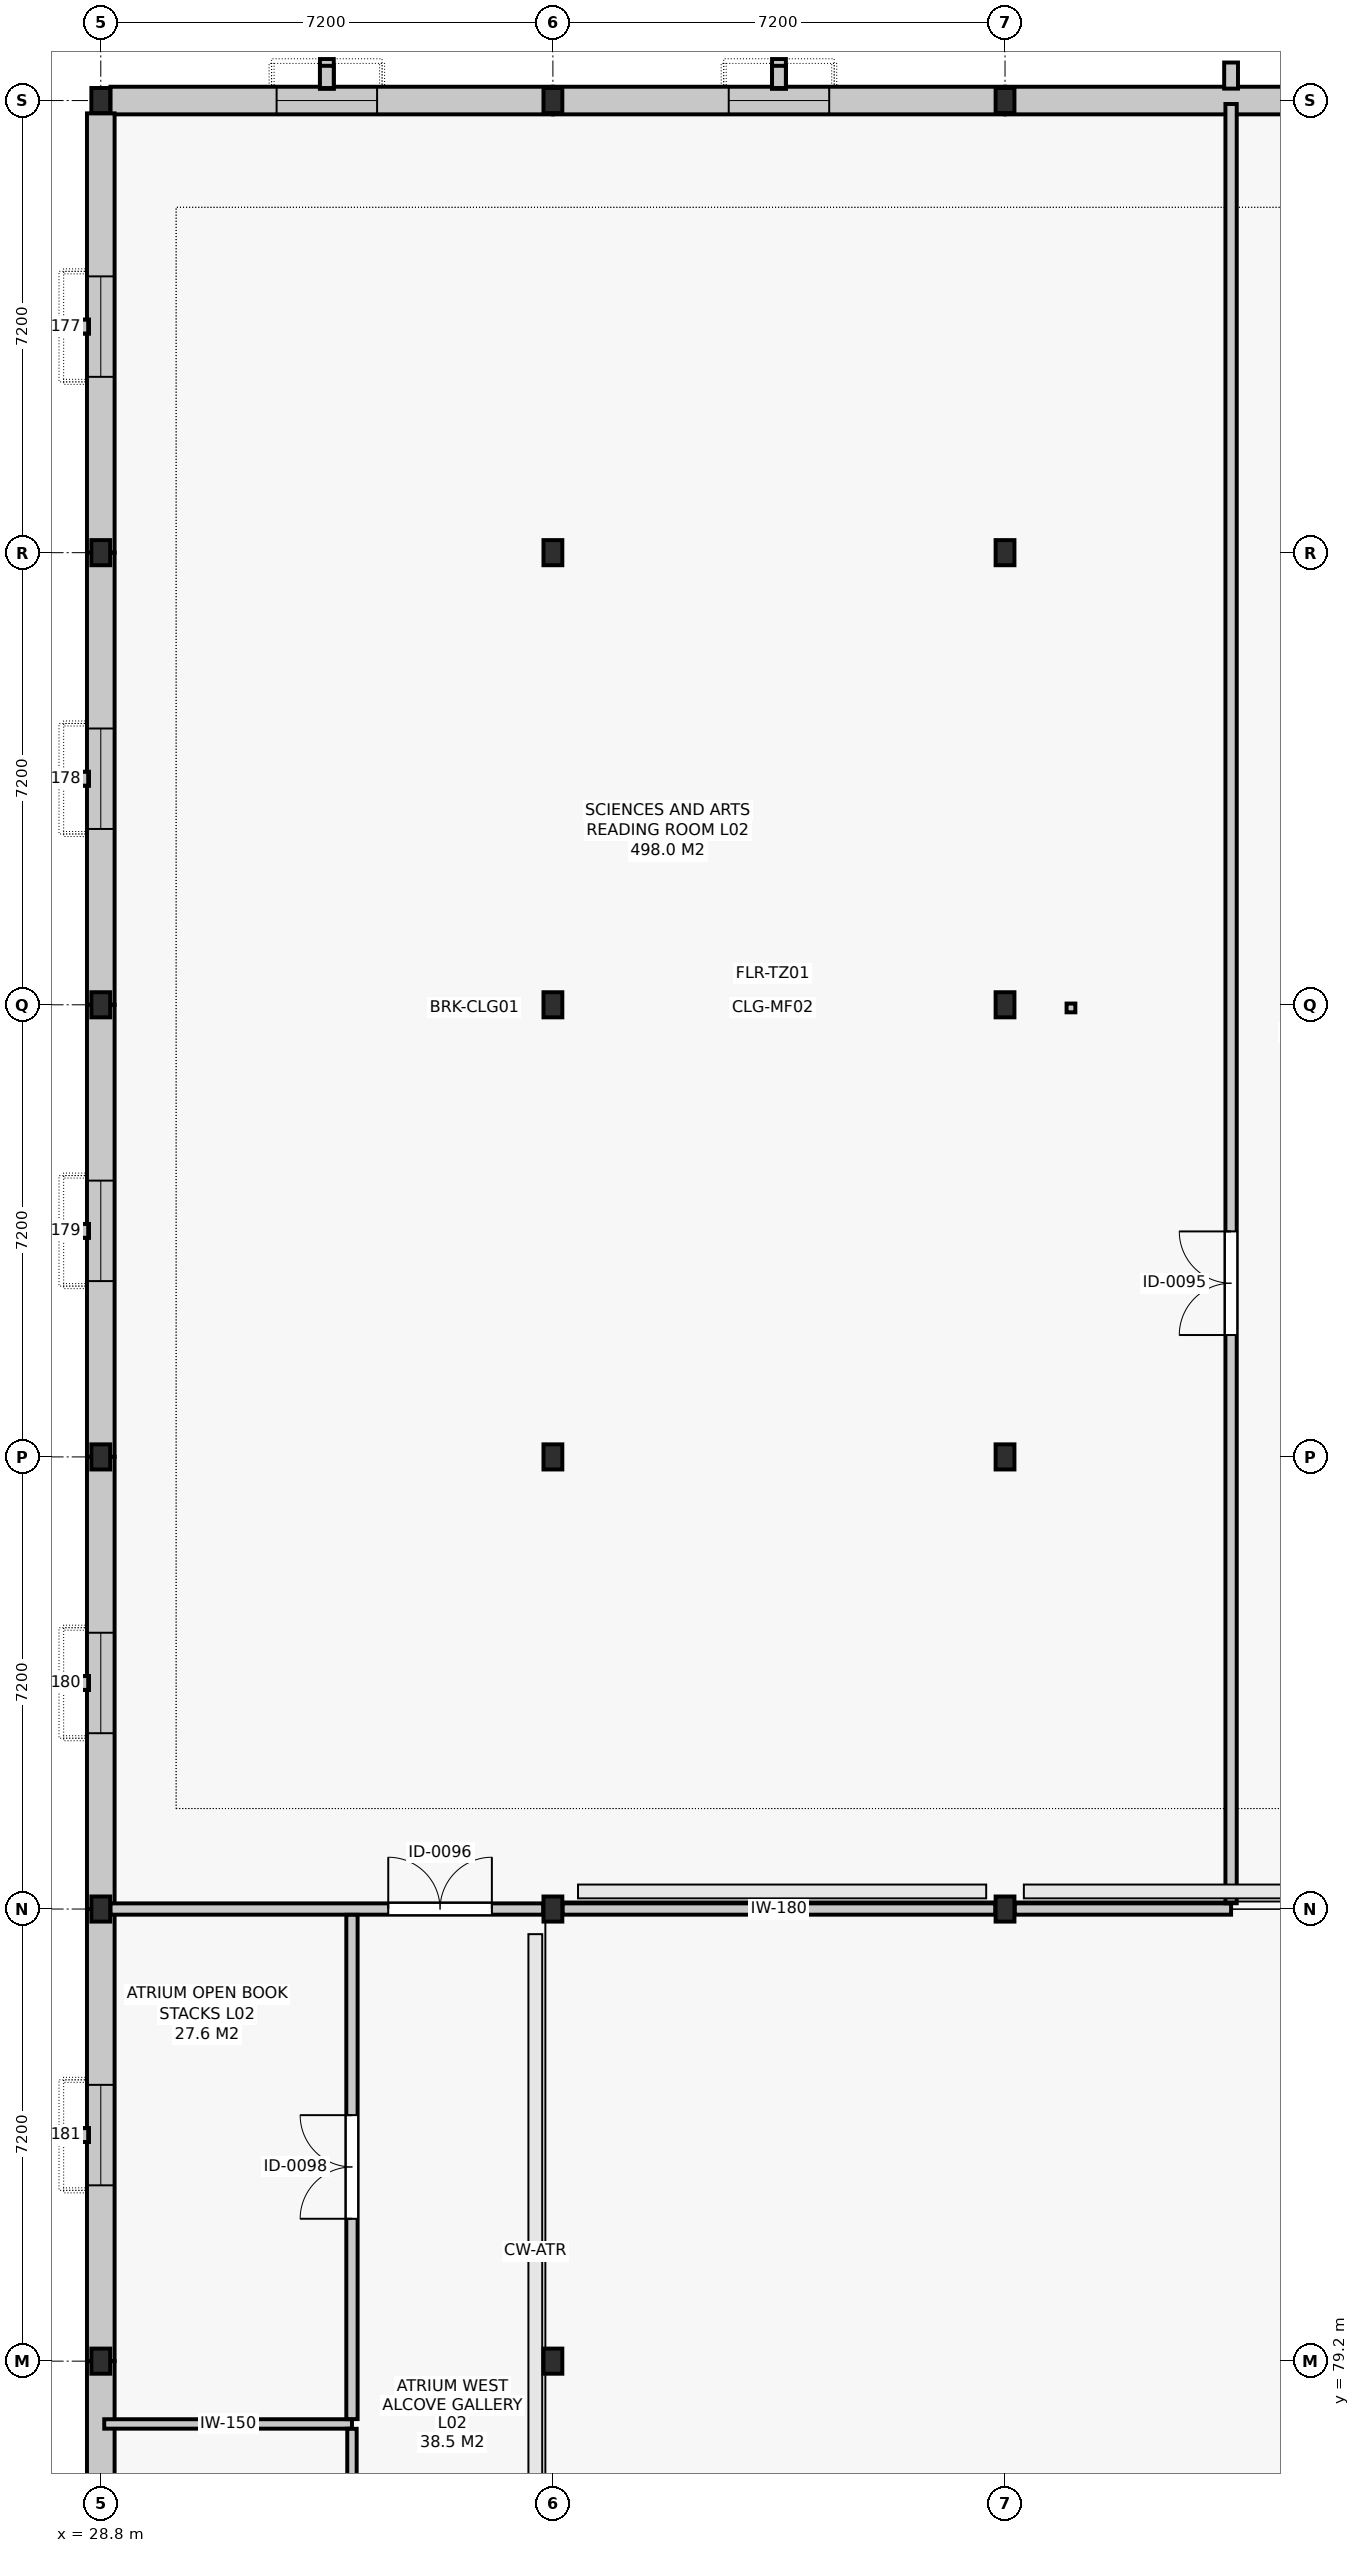
"""IFC4 building model, lengths in metres.
Left out: names, types, materials, properties, quantities, classifications, styles, units other than length and angle.
Written with IfcOpenShell. Run it as: python <this file> out.ifc"""

import sys

from ifc_helpers import new_model, si_unit, direction, frame, frame_2d, origin, origin_2d, place, context, subcontext, project, spatial, rectangle, i_section, extrude, element, fill, save


model = new_model("IFC4")
c1 = context("Model", 3, precision=1e-05, world=origin(), true_north=direction((0.0, 1.0)))
c2 = subcontext(c1, "Body", "Model", "MODEL_VIEW")
j1 = project(units=[si_unit("LENGTHUNIT", "METRE"), si_unit("PLANEANGLEUNIT", "RADIAN")], contexts=[c1])
p1 = place(None, origin())
s1 = spatial("IfcSite", under=j1, at=p1, CompositionType="ELEMENT")
p2 = place(p1, origin())
s2 = spatial("IfcBuilding", under=s1, at=p2, CompositionType="ELEMENT")
p3 = place(p2, frame((0.0, 0.0, 10.2)))
s3 = spatial("IfcBuildingStorey", under=s2, at=p3, CompositionType="ELEMENT", Elevation=10.2)
for number, where, z_axis, x_axis in (
    (1, (28.8, 79.2, 0.0), (0.0, 0.0, 1.0), (1.0, 0.0, 0.0)),
    (2, (28.8, 86.4, 0.0), (0.0, 0.0, 1.0), (1.0, 0.0, 0.0)),
    (3, (28.8, 93.6, 0.0), (0.0, 0.0, 1.0), (1.0, 0.0, 0.0)),
    (4, (28.8, 100.8, 0.0), (0.0, 0.0, 1.0), (1.0, 0.0, 0.0)),
    (5, (28.8, 108.0, 0.0), (0.0, 0.0, 1.0), (1.0, 0.0, 0.0)),
    (6, (28.8, 115.2, 0.0), (0.0, 0.0, 1.0), (1.0, 0.0, 0.0)),
    (7, (36.0, 79.2, 0.0), (0.0, 0.0, 1.0), (1.0, 0.0, 0.0)),
    (8, (36.0, 86.4, 0.0), (0.0, 0.0, 1.0), (1.0, 0.0, 0.0)),
    (9, (36.0, 93.6, 0.0), (0.0, 0.0, 1.0), (1.0, 0.0, 0.0)),
    (10, (36.0, 100.8, 0.0), (0.0, 0.0, 1.0), (1.0, 0.0, 0.0)),
    (11, (36.0, 108.0, 0.0), (0.0, 0.0, 1.0), (1.0, 0.0, 0.0)),
    (12, (36.0, 115.2, 0.0), (0.0, 0.0, 1.0), (1.0, 0.0, 0.0)),
    (13, (43.2, 86.4, 0.0), (0.0, 0.0, 1.0), (1.0, 0.0, 0.0)),
    (14, (43.2, 93.6, 0.0), (0.0, 0.0, 1.0), (1.0, 0.0, 0.0)),
    (15, (43.2, 100.8, 0.0), (0.0, 0.0, 1.0), (1.0, 0.0, 0.0)),
    (16, (43.2, 108.0, 0.0), (0.0, 0.0, 1.0), (1.0, 0.0, 0.0)),
    (17, (43.2, 115.2, 0.0), (0.0, 0.0, 1.0), (1.0, 0.0, 0.0)),
):
    element("IfcColumn", number, at=place(p3, frame(where, z_axis=z_axis, x_axis=x_axis)), inside=s3, PredefinedType="COLUMN", context=c2, shape_type="SweptSolid", body=[
        extrude(i_section(OverallWidth=0.3, OverallDepth=0.4, WebThickness=0.013, FlangeThickness=0.024, FilletRadius=0.027, at=origin_2d()), origin(), (0.0, 0.0, 1.0), 4.2),
    ])
p4 = place(p3, frame((50.4, 115.2, 0.0), z_axis=(0.0, 0.0, 1.0), x_axis=(-1.0, 0.0, 0.0)))
e18 = element("IfcWall", 18, at=p4, inside=s3, PredefinedType="SOLIDWALL", context=c2, shape_type="SweptSolid", body=[
    extrude(rectangle(XDim=7.2, YDim=0.44, at=frame_2d((3.6, 0.0))), origin(), (0.0, 0.0, 1.0), 3.2),
])
p5 = place(p3, frame((43.2, 115.2, 0.0), z_axis=(0.0, 0.0, 1.0), x_axis=(-1.0, 0.0, 0.0)))
e19 = element("IfcWall", 19, at=p5, inside=s3, PredefinedType="SOLIDWALL", context=c2, shape_type="SweptSolid", body=[
    extrude(rectangle(XDim=7.2, YDim=0.44, at=frame_2d((3.6, 0.0))), origin(), (0.0, 0.0, 1.0), 3.2),
])
p6 = place(p5, frame((2.8, 0.0, 0.92)))
e20 = element("IfcOpeningElement", 20, at=p6, cuts=e19, PredefinedType="OPENING", context=c2, shape_type="SweptSolid", body=[
    extrude(rectangle(XDim=1.6, YDim=2.2, at=frame_2d((0.8, 1.1))), frame((0.0, 0.232, 0.0), z_axis=(0.0, -1.0, 0.0), x_axis=(1.0, 0.0, 0.0)), (0.0, 0.0, 1.0), 0.464),
])
p7 = place(p3, frame((36.0, 115.2, 0.0), z_axis=(0.0, 0.0, 1.0), x_axis=(-1.0, 0.0, 0.0)))
e21 = element("IfcWall", 21, at=p7, inside=s3, PredefinedType="SOLIDWALL", context=c2, shape_type="SweptSolid", body=[
    extrude(rectangle(XDim=7.046, YDim=0.44, at=frame_2d((3.523, 0.0))), origin(), (0.0, 0.0, 1.0), 3.2),
])
p8 = place(p7, frame((2.8, 0.0, 0.92)))
e22 = element("IfcOpeningElement", 22, at=p8, cuts=e21, PredefinedType="OPENING", context=c2, shape_type="SweptSolid", body=[
    extrude(rectangle(XDim=1.6, YDim=2.2, at=frame_2d((0.8, 1.1))), frame((0.0, 0.232, 0.0), z_axis=(0.0, -1.0, 0.0), x_axis=(1.0, 0.0, 0.0)), (0.0, 0.0, 1.0), 0.464),
])
p9 = place(p3, frame((28.8, 114.996, 0.0), z_axis=(0.0, 0.0, 1.0), x_axis=(0.0, -1.0, 0.0)))
e23 = element("IfcWall", 23, at=p9, inside=s3, PredefinedType="SOLIDWALL", context=c2, shape_type="SweptSolid", body=[
    extrude(rectangle(XDim=6.996, YDim=0.44, at=frame_2d((3.498, 0.0))), origin(), (0.0, 0.0, 1.0), 3.2),
])
p10 = place(p9, frame((2.596, 0.0, 0.92)))
e24 = element("IfcOpeningElement", 24, at=p10, cuts=e23, PredefinedType="OPENING", context=c2, shape_type="SweptSolid", body=[
    extrude(rectangle(XDim=1.6, YDim=2.2, at=frame_2d((0.8, 1.1))), frame((0.0, 0.232, 0.0), z_axis=(0.0, -1.0, 0.0), x_axis=(1.0, 0.0, 0.0)), (0.0, 0.0, 1.0), 0.464),
])
p11 = place(p3, frame((28.8, 108.0, 0.0), z_axis=(0.0, 0.0, 1.0), x_axis=(0.0, -1.0, 0.0)))
e25 = element("IfcWall", 25, at=p11, inside=s3, PredefinedType="SOLIDWALL", context=c2, shape_type="SweptSolid", body=[
    extrude(rectangle(XDim=7.2, YDim=0.44, at=frame_2d((3.6, 0.0))), origin(), (0.0, 0.0, 1.0), 3.2),
])
p12 = place(p11, frame((2.8, 0.0, 0.92)))
e26 = element("IfcOpeningElement", 26, at=p12, cuts=e25, PredefinedType="OPENING", context=c2, shape_type="SweptSolid", body=[
    extrude(rectangle(XDim=1.6, YDim=2.2, at=frame_2d((0.8, 1.1))), frame((0.0, 0.232, 0.0), z_axis=(0.0, -1.0, 0.0), x_axis=(1.0, 0.0, 0.0)), (0.0, 0.0, 1.0), 0.464),
])
p13 = place(p3, frame((28.8, 100.8, 0.0), z_axis=(0.0, 0.0, 1.0), x_axis=(0.0, -1.0, 0.0)))
e27 = element("IfcWall", 27, at=p13, inside=s3, PredefinedType="SOLIDWALL", context=c2, shape_type="SweptSolid", body=[
    extrude(rectangle(XDim=7.2, YDim=0.44, at=frame_2d((3.6, 0.0))), origin(), (0.0, 0.0, 1.0), 3.2),
])
p14 = place(p13, frame((2.8, 0.0, 0.92)))
e28 = element("IfcOpeningElement", 28, at=p14, cuts=e27, PredefinedType="OPENING", context=c2, shape_type="SweptSolid", body=[
    extrude(rectangle(XDim=1.6, YDim=2.2, at=frame_2d((0.8, 1.1))), frame((0.0, 0.232, 0.0), z_axis=(0.0, -1.0, 0.0), x_axis=(1.0, 0.0, 0.0)), (0.0, 0.0, 1.0), 0.464),
])
p15 = place(p3, frame((28.8, 93.6, 0.0), z_axis=(0.0, 0.0, 1.0), x_axis=(0.0, -1.0, 0.0)))
e29 = element("IfcWall", 29, at=p15, inside=s3, PredefinedType="SOLIDWALL", context=c2, shape_type="SweptSolid", body=[
    extrude(rectangle(XDim=7.2, YDim=0.44, at=frame_2d((3.6, 0.0))), origin(), (0.0, 0.0, 1.0), 3.2),
])
p16 = place(p15, frame((2.8, 0.0, 0.92)))
e30 = element("IfcOpeningElement", 30, at=p16, cuts=e29, PredefinedType="OPENING", context=c2, shape_type="SweptSolid", body=[
    extrude(rectangle(XDim=1.6, YDim=2.2, at=frame_2d((0.8, 1.1))), frame((0.0, 0.232, 0.0), z_axis=(0.0, -1.0, 0.0), x_axis=(1.0, 0.0, 0.0)), (0.0, 0.0, 1.0), 0.464),
])
p17 = place(p3, frame((28.8, 86.4, 0.0), z_axis=(0.0, 0.0, 1.0), x_axis=(0.0, -1.0, 0.0)))
e31 = element("IfcWall", 31, at=p17, inside=s3, PredefinedType="SOLIDWALL", context=c2, shape_type="SweptSolid", body=[
    extrude(rectangle(XDim=7.2, YDim=0.44, at=frame_2d((3.6, 0.0))), origin(), (0.0, 0.0, 1.0), 3.2),
])
p18 = place(p17, frame((2.8, 0.0, 0.92)))
e32 = element("IfcOpeningElement", 32, at=p18, cuts=e31, PredefinedType="OPENING", context=c2, shape_type="SweptSolid", body=[
    extrude(rectangle(XDim=1.6, YDim=2.2, at=frame_2d((0.8, 1.1))), frame((0.0, 0.232, 0.0), z_axis=(0.0, -1.0, 0.0), x_axis=(1.0, 0.0, 0.0)), (0.0, 0.0, 1.0), 0.464),
])
p19 = place(p3, frame((28.8, 79.2, 0.0), z_axis=(0.0, 0.0, 1.0), x_axis=(0.0, -1.0, 0.0)))
e33 = element("IfcWall", 33, at=p19, inside=s3, PredefinedType="SOLIDWALL", context=c2, shape_type="SweptSolid", body=[
    extrude(rectangle(XDim=7.2, YDim=0.44, at=frame_2d((3.6, 0.0))), origin(), (0.0, 0.0, 1.0), 3.2),
])
p20 = place(p19, frame((2.8, 0.0, 0.92)))
e34 = element("IfcOpeningElement", 34, at=p20, cuts=e33, PredefinedType="OPENING", context=c2, shape_type="SweptSolid", body=[
    extrude(rectangle(XDim=1.6, YDim=2.2, at=frame_2d((0.8, 1.1))), frame((0.0, 0.232, 0.0), z_axis=(0.0, -1.0, 0.0), x_axis=(1.0, 0.0, 0.0)), (0.0, 0.0, 1.0), 0.464),
])
p21 = place(p3, frame((28.855, 78.2, 0.0), z_axis=(0.0, 0.0, 1.0), x_axis=(1.0, 0.0, 0.0)))
e35 = element("IfcWall", 35, at=p21, inside=s3, PredefinedType="PARTITIONING", context=c2, shape_type="SweptSolid", body=[
    extrude(rectangle(XDim=3.945, YDim=0.15, at=frame_2d((1.973, 0.0))), origin(), (0.0, 0.0, 1.0), 3.355),
])
p22 = place(p3, frame((28.954, 86.4, 0.0), z_axis=(0.0, 0.0, 1.0), x_axis=(1.0, 0.0, 0.0)))
e36 = element("IfcWall", 36, at=p22, inside=s3, PredefinedType="PARTITIONING", context=c2, shape_type="SweptSolid", body=[
    extrude(rectangle(XDim=6.892, YDim=0.18, at=frame_2d((3.446, 0.0))), origin(), (0.0, 0.0, 1.0), 3.595),
])
p23 = place(p22, frame((4.424, 0.0, 0.0)))
e37 = element("IfcOpeningElement", 37, at=p23, cuts=e36, PredefinedType="OPENING", context=c2, shape_type="SweptSolid", body=[
    extrude(rectangle(XDim=1.65, YDim=2.25, at=frame_2d((0.825, 1.125))), frame((0.0, 0.102, 0.0), z_axis=(0.0, -1.0, 0.0), x_axis=(1.0, 0.0, 0.0)), (0.0, 0.0, 1.0), 0.204),
])
p24 = place(p3, frame((36.154, 86.4, 0.0), z_axis=(0.0, 0.0, 1.0), x_axis=(1.0, 0.0, 0.0)))
e38 = element("IfcWall", 38, at=p24, inside=s3, PredefinedType="PARTITIONING", context=c2, shape_type="SweptSolid", body=[
    extrude(rectangle(XDim=6.892, YDim=0.18, at=frame_2d((3.446, 0.0))), origin(), (0.0, 0.0, 1.0), 3.905),
])
p25 = place(p3, frame((43.354, 86.4, 0.0), z_axis=(0.0, 0.0, 1.0), x_axis=(1.0, 0.0, 0.0)))
e39 = element("IfcWall", 39, at=p25, inside=s3, PredefinedType="PARTITIONING", context=c2, shape_type="SweptSolid", body=[
    extrude(rectangle(XDim=3.446, YDim=0.18, at=frame_2d((1.723, 0.0))), origin(), (0.0, 0.0, 1.0), 3.905),
])
p26 = place(p3, frame((32.8, 72.077, 0.0), z_axis=(0.0, 0.0, 1.0), x_axis=(0.0, 1.0, 0.0)))
e40 = element("IfcWall", 40, at=p26, inside=s3, PredefinedType="PARTITIONING", context=c2, shape_type="SweptSolid", body=[
    extrude(rectangle(XDim=6.046, YDim=0.15, at=frame_2d((3.023, 0.0))), origin(), (0.0, 0.0, 1.0), 3.595),
])
p27 = place(p26, frame((2.533, 0.0, 0.0)))
e41 = element("IfcOpeningElement", 41, at=p27, cuts=e40, PredefinedType="OPENING", context=c2, shape_type="SweptSolid", body=[
    extrude(rectangle(XDim=0.98, YDim=2.1, at=frame_2d((0.49, 1.05))), frame((0.0, 0.087, 0.0), z_axis=(0.0, -1.0, 0.0), x_axis=(1.0, 0.0, 0.0)), (0.0, 0.0, 1.0), 0.174),
])
p28 = place(p3, frame((46.8, 86.492, 0.0), z_axis=(0.0, 0.0, 1.0), x_axis=(0.0, 1.0, 0.0)))
e42 = element("IfcWall", 42, at=p28, inside=s3, PredefinedType="PARTITIONING", context=c2, shape_type="SweptSolid", body=[
    extrude(rectangle(XDim=28.653, YDim=0.18, at=frame_2d((14.327, 0.0))), origin(), (0.0, 0.0, 1.0), 3.355),
])
p29 = place(p28, frame((9.049, 0.0, 0.0)))
e43 = element("IfcOpeningElement", 43, at=p29, cuts=e42, PredefinedType="OPENING", context=c2, shape_type="SweptSolid", body=[
    extrude(rectangle(XDim=1.65, YDim=2.25, at=frame_2d((0.825, 1.125))), frame((0.0, 0.102, 0.0), z_axis=(0.0, -1.0, 0.0), x_axis=(1.0, 0.0, 0.0)), (0.0, 0.0, 1.0), 0.204),
])
p30 = place(p3, frame((32.8, 78.277, 0.0), z_axis=(0.0, 0.0, 1.0), x_axis=(0.0, 1.0, 0.0)))
e44 = element("IfcWall", 44, at=p30, inside=s3, PredefinedType="PARTITIONING", context=c2, shape_type="SweptSolid", body=[
    extrude(rectangle(XDim=8.031, YDim=0.18, at=frame_2d((4.016, 0.0))), origin(), (0.0, 0.0, 1.0), 3.595),
])
p31 = place(p30, frame((3.19, 0.0, 0.0)))
e45 = element("IfcOpeningElement", 45, at=p31, cuts=e44, PredefinedType="OPENING", context=c2, shape_type="SweptSolid", body=[
    extrude(rectangle(XDim=1.65, YDim=2.25, at=frame_2d((0.825, 1.125))), frame((0.0, 0.102, 0.0), z_axis=(0.0, -1.0, 0.0), x_axis=(1.0, 0.0, 0.0)), (0.0, 0.0, 1.0), 0.204),
])
p32 = place(p6, origin())
e46 = element("IfcWindow", 46, at=p32, inside=s3, PartitioningType="SINGLE_PANEL", PredefinedType="WINDOW", context=c2, shape_type="SweptSolid", body=[
    extrude(rectangle(XDim=1.6, YDim=2.2, at=frame_2d((0.8, 1.1))), frame((0.0, 0.03, 0.0), z_axis=(0.0, -1.0, 0.0), x_axis=(1.0, 0.0, 0.0)), (0.0, 0.0, 1.0), 0.06),
])
fill(e20, e46)
p33 = place(p8, origin())
e47 = element("IfcWindow", 47, at=p33, inside=s3, PartitioningType="SINGLE_PANEL", PredefinedType="WINDOW", context=c2, shape_type="SweptSolid", body=[
    extrude(rectangle(XDim=1.6, YDim=2.2, at=frame_2d((0.8, 1.1))), frame((0.0, 0.03, 0.0), z_axis=(0.0, -1.0, 0.0), x_axis=(1.0, 0.0, 0.0)), (0.0, 0.0, 1.0), 0.06),
])
fill(e22, e47)
p34 = place(p10, origin())
e48 = element("IfcWindow", 48, at=p34, inside=s3, PartitioningType="SINGLE_PANEL", PredefinedType="WINDOW", context=c2, shape_type="SweptSolid", body=[
    extrude(rectangle(XDim=1.6, YDim=2.2, at=frame_2d((0.8, 1.1))), frame((0.0, 0.03, 0.0), z_axis=(0.0, -1.0, 0.0), x_axis=(1.0, 0.0, 0.0)), (0.0, 0.0, 1.0), 0.06),
])
fill(e24, e48)
p35 = place(p12, origin())
e49 = element("IfcWindow", 49, at=p35, inside=s3, PartitioningType="SINGLE_PANEL", PredefinedType="WINDOW", context=c2, shape_type="SweptSolid", body=[
    extrude(rectangle(XDim=1.6, YDim=2.2, at=frame_2d((0.8, 1.1))), frame((0.0, 0.03, 0.0), z_axis=(0.0, -1.0, 0.0), x_axis=(1.0, 0.0, 0.0)), (0.0, 0.0, 1.0), 0.06),
])
fill(e26, e49)
p36 = place(p14, origin())
e50 = element("IfcWindow", 50, at=p36, inside=s3, PartitioningType="SINGLE_PANEL", PredefinedType="WINDOW", context=c2, shape_type="SweptSolid", body=[
    extrude(rectangle(XDim=1.6, YDim=2.2, at=frame_2d((0.8, 1.1))), frame((0.0, 0.03, 0.0), z_axis=(0.0, -1.0, 0.0), x_axis=(1.0, 0.0, 0.0)), (0.0, 0.0, 1.0), 0.06),
])
fill(e28, e50)
p37 = place(p16, origin())
e51 = element("IfcWindow", 51, at=p37, inside=s3, PartitioningType="SINGLE_PANEL", PredefinedType="WINDOW", context=c2, shape_type="SweptSolid", body=[
    extrude(rectangle(XDim=1.6, YDim=2.2, at=frame_2d((0.8, 1.1))), frame((0.0, 0.03, 0.0), z_axis=(0.0, -1.0, 0.0), x_axis=(1.0, 0.0, 0.0)), (0.0, 0.0, 1.0), 0.06),
])
fill(e30, e51)
p38 = place(p18, origin())
e52 = element("IfcWindow", 52, at=p38, inside=s3, PartitioningType="SINGLE_PANEL", PredefinedType="WINDOW", context=c2, shape_type="SweptSolid", body=[
    extrude(rectangle(XDim=1.6, YDim=2.2, at=frame_2d((0.8, 1.1))), frame((0.0, 0.03, 0.0), z_axis=(0.0, -1.0, 0.0), x_axis=(1.0, 0.0, 0.0)), (0.0, 0.0, 1.0), 0.06),
])
fill(e32, e52)
p39 = place(p29, origin())
e53 = element("IfcDoor", 53, at=p39, inside=s3, OperationType="DOUBLE_DOOR_SINGLE_SWING", PredefinedType="DOOR", context=c2, shape_type="SweptSolid", body=[
    extrude(rectangle(XDim=1.65, YDim=2.25, at=frame_2d((0.825, 1.125))), frame((0.0, 0.025, 0.0), z_axis=(0.0, -1.0, 0.0), x_axis=(1.0, 0.0, 0.0)), (0.0, 0.0, 1.0), 0.05),
])
fill(e43, e53)
p40 = place(p23, origin())
e54 = element("IfcDoor", 54, at=p40, inside=s3, OperationType="DOUBLE_DOOR_SINGLE_SWING", PredefinedType="DOOR", context=c2, shape_type="SweptSolid", body=[
    extrude(rectangle(XDim=1.65, YDim=2.25, at=frame_2d((0.825, 1.125))), frame((0.0, 0.025, 0.0), z_axis=(0.0, -1.0, 0.0), x_axis=(1.0, 0.0, 0.0)), (0.0, 0.0, 1.0), 0.05),
])
fill(e37, e54)
p41 = place(p31, origin())
e55 = element("IfcDoor", 55, at=p41, inside=s3, OperationType="DOUBLE_DOOR_SINGLE_SWING", PredefinedType="DOOR", context=c2, shape_type="SweptSolid", body=[
    extrude(rectangle(XDim=1.65, YDim=2.25, at=frame_2d((0.825, 1.125))), frame((0.0, 0.025, 0.0), z_axis=(0.0, -1.0, 0.0), x_axis=(1.0, 0.0, 0.0)), (0.0, 0.0, 1.0), 0.05),
])
fill(e45, e55)
save(model, sys.argv[1])
